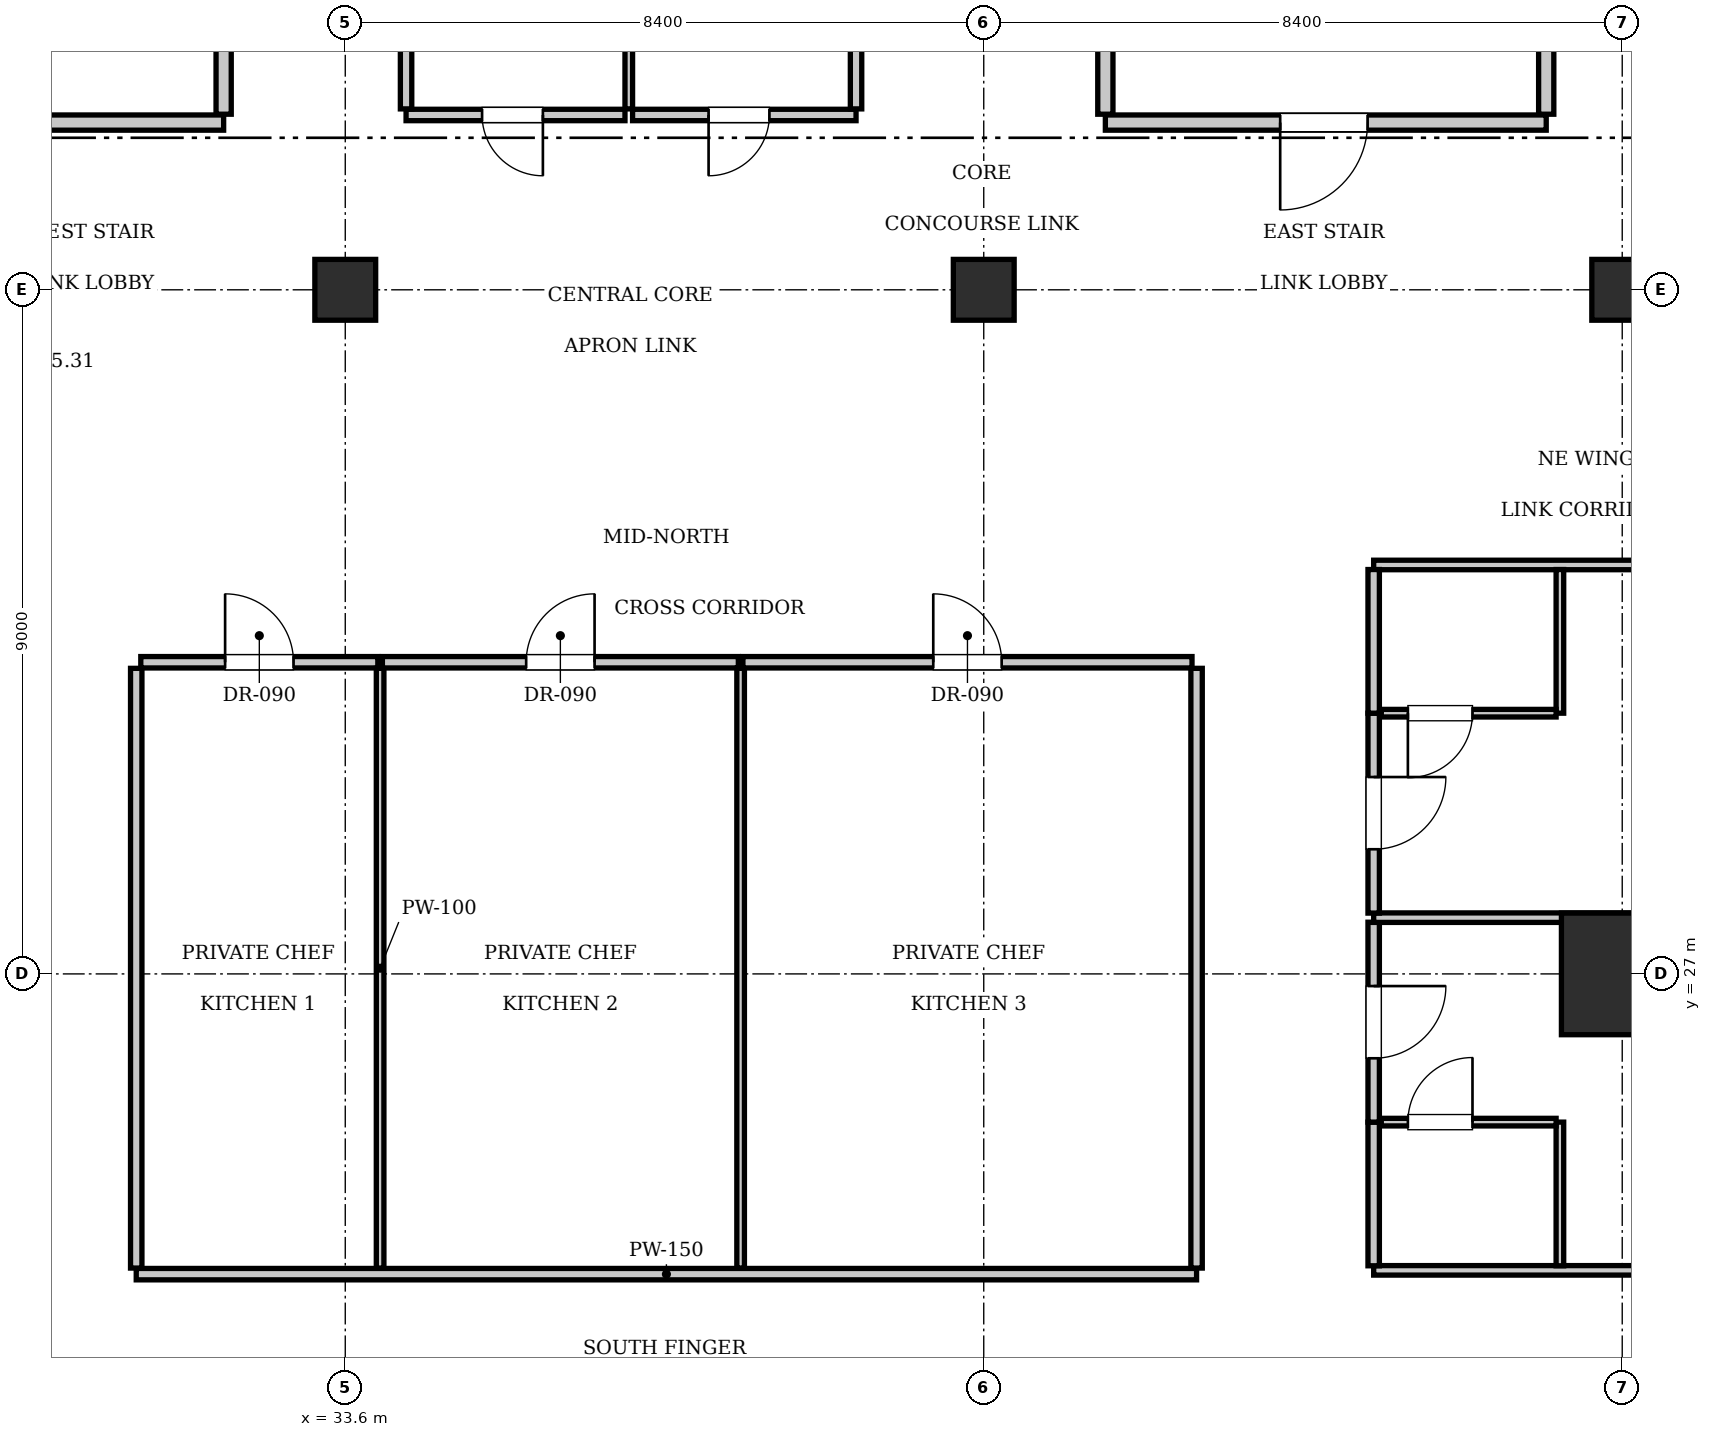
"""IFC4 building model, lengths in metres.
Left out: names, types, materials, properties, quantities, classifications, styles, units other than length and angle.
Written with IfcOpenShell. Run it as: python <this file> out.ifc"""

import sys

from ifc_helpers import new_model, si_unit, direction, frame, frame_2d, origin, origin_2d, place, context, subcontext, project, spatial, rectangle, extrude, element, fill, save


model = new_model("IFC4")
c1 = context("Model", 3, precision=1e-05, world=origin(), true_north=direction((0.0, 1.0)))
c2 = subcontext(c1, "Body", "Model", "MODEL_VIEW")
j1 = project(units=[si_unit("LENGTHUNIT", "METRE"), si_unit("PLANEANGLEUNIT", "RADIAN")], contexts=[c1])
p1 = place(None, origin())
s1 = spatial("IfcSite", under=j1, at=p1, CompositionType="ELEMENT")
p2 = place(p1, origin())
s2 = spatial("IfcBuilding", under=s1, at=p2, CompositionType="ELEMENT")
p3 = place(p2, frame((0.0, 0.0, 277.9)))
s3 = spatial("IfcBuildingStorey", under=s2, at=p3, CompositionType="ELEMENT", Elevation=277.9)
p4 = place(p3, frame((50.4, 27.0, 0.0), z_axis=(0.0, 0.0, 1.0), x_axis=(1.0, 0.0, 0.0)))
e1 = element("IfcColumn", 1, at=p4, inside=s3, PredefinedType="COLUMN", context=c2, shape_type="SweptSolid", body=[
    extrude(rectangle(XDim=1.6, YDim=1.6, at=origin_2d()), origin(), (0.0, 0.0, 1.0), 3.85),
])
for number, where, z_axis, x_axis in (
    (2, (33.6, 36.0, 0.0), (0.0, 0.0, 1.0), (1.0, 0.0, 0.0)),
    (3, (42.0, 36.0, 0.0), (0.0, 0.0, 1.0), (1.0, 0.0, 0.0)),
    (4, (50.4, 36.0, 0.0), (0.0, 0.0, 1.0), (1.0, 0.0, 0.0)),
):
    element("IfcColumn", number, at=place(p3, frame(where, z_axis=z_axis, x_axis=x_axis)), inside=s3, PredefinedType="COLUMN", context=c2, shape_type="SweptSolid", body=[
        extrude(rectangle(XDim=0.8, YDim=0.8, at=origin_2d()), origin(), (0.0, 0.0, 1.0), 3.85),
    ])
p5 = place(p3, frame((26.2, 38.2, 0.0), z_axis=(0.0, 0.0, 1.0), x_axis=(1.0, 0.0, 0.0)))
e5 = element("IfcWall", 5, at=p5, inside=s3, PredefinedType="PARTITIONING", context=c2, shape_type="SweptSolid", body=[
    extrude(rectangle(XDim=5.8, YDim=0.2, at=frame_2d((2.9, 0.0))), origin(), (0.0, 0.0, 1.0), 3.61),
])
p6 = place(p5, frame((2.3, 0.0, 0.0)))
e6 = element("IfcOpeningElement", 6, at=p6, cuts=e5, PredefinedType="OPENING", context=c2, shape_type="SweptSolid", body=[
    extrude(rectangle(XDim=1.15, YDim=2.15, at=frame_2d((0.575, 1.075))), frame((0.0, 0.11, 0.0), z_axis=(0.0, -1.0, 0.0), x_axis=(1.0, 0.0, 0.0)), (0.0, 0.0, 1.0), 0.22),
])
p7 = place(p3, frame((32.0, 38.31, 0.0), z_axis=(0.0, 0.0, 1.0), x_axis=(0.0, 1.0, 0.0)))
e7 = element("IfcWall", 7, at=p7, inside=s3, PredefinedType="PARTITIONING", context=c2, shape_type="SweptSolid", body=[
    extrude(rectangle(XDim=3.07, YDim=0.2, at=frame_2d((1.535, 0.0))), origin(), (0.0, 0.0, 1.0), 3.61),
])
p8 = place(p3, frame((43.6, 38.2, 0.0), z_axis=(0.0, 0.0, 1.0), x_axis=(1.0, 0.0, 0.0)))
e8 = element("IfcWall", 8, at=p8, inside=s3, PredefinedType="PARTITIONING", context=c2, shape_type="SweptSolid", body=[
    extrude(rectangle(XDim=5.8, YDim=0.2, at=frame_2d((2.9, 0.0))), origin(), (0.0, 0.0, 1.0), 3.61),
])
p9 = place(p8, frame((2.3, 0.0, 0.0)))
e9 = element("IfcOpeningElement", 9, at=p9, cuts=e8, PredefinedType="OPENING", context=c2, shape_type="SweptSolid", body=[
    extrude(rectangle(XDim=1.15, YDim=2.15, at=frame_2d((0.575, 1.075))), frame((0.0, 0.11, 0.0), z_axis=(0.0, -1.0, 0.0), x_axis=(1.0, 0.0, 0.0)), (0.0, 0.0, 1.0), 0.22),
])
for number, where, z_axis, x_axis in (
    (10, (43.6, 38.31, 0.0), (0.0, 0.0, 1.0), (0.0, 1.0, 0.0)),
    (11, (49.4, 38.31, 0.0), (0.0, 0.0, 1.0), (0.0, 1.0, 0.0)),
):
    element("IfcWall", number, at=place(p3, frame(where, z_axis=z_axis, x_axis=x_axis)), inside=s3, PredefinedType="PARTITIONING", context=c2, shape_type="SweptSolid", body=[
        extrude(rectangle(XDim=3.07, YDim=0.2, at=frame_2d((1.535, 0.0))), origin(), (0.0, 0.0, 1.0), 3.61),
    ])
p10 = place(p3, frame((34.4, 38.3, 0.0), z_axis=(0.0, 0.0, 1.0), x_axis=(1.0, 0.0, 0.0)))
e12 = element("IfcWall", 12, at=p10, inside=s3, PredefinedType="PARTITIONING", context=c2, shape_type="SweptSolid", body=[
    extrude(rectangle(XDim=2.88, YDim=0.15, at=frame_2d((1.44, 0.0))), origin(), (0.0, 0.0, 1.0), 3.61),
])
p11 = place(p10, frame((1.0, 0.0, 0.0)))
e13 = element("IfcOpeningElement", 13, at=p11, cuts=e12, PredefinedType="OPENING", context=c2, shape_type="SweptSolid", body=[
    extrude(rectangle(XDim=0.8, YDim=2.05, at=frame_2d((0.4, 1.025))), frame((0.0, 0.085, 0.0), z_axis=(0.0, -1.0, 0.0), x_axis=(1.0, 0.0, 0.0)), (0.0, 0.0, 1.0), 0.17),
])
p12 = place(p3, frame((37.38, 38.3, 0.0), z_axis=(0.0, 0.0, 1.0), x_axis=(1.0, 0.0, 0.0)))
e14 = element("IfcWall", 14, at=p12, inside=s3, PredefinedType="PARTITIONING", context=c2, shape_type="SweptSolid", body=[
    extrude(rectangle(XDim=2.94, YDim=0.15, at=frame_2d((1.47, 0.0))), origin(), (0.0, 0.0, 1.0), 3.61),
])
p13 = place(p12, frame((1.0, 0.0, 0.0)))
e15 = element("IfcOpeningElement", 15, at=p13, cuts=e14, PredefinedType="OPENING", context=c2, shape_type="SweptSolid", body=[
    extrude(rectangle(XDim=0.8, YDim=2.05, at=frame_2d((0.4, 1.025))), frame((0.0, 0.085, 0.0), z_axis=(0.0, -1.0, 0.0), x_axis=(1.0, 0.0, 0.0)), (0.0, 0.0, 1.0), 0.17),
])
p14 = place(p3, frame((34.4, 38.38, 0.0), z_axis=(0.0, 0.0, 1.0), x_axis=(0.0, 1.0, 0.0)))
e16 = element("IfcWall", 16, at=p14, inside=s3, PredefinedType="PARTITIONING", context=c2, shape_type="SweptSolid", body=[
    extrude(rectangle(XDim=2.84, YDim=0.15, at=frame_2d((1.42, 0.0))), origin(), (0.0, 0.0, 1.0), 3.61),
])
p15 = place(p3, frame((37.33, 38.38, 0.0), z_axis=(0.0, 0.0, 1.0), x_axis=(0.0, 1.0, 0.0)))
e17 = element("IfcWall", 17, at=p15, inside=s3, PredefinedType="PARTITIONING", context=c2, shape_type="SweptSolid", body=[
    extrude(rectangle(XDim=2.84, YDim=0.1, at=frame_2d((1.42, 0.0))), origin(), (0.0, 0.0, 1.0), 3.61),
])
p16 = place(p3, frame((40.32, 38.38, 0.0), z_axis=(0.0, 0.0, 1.0), x_axis=(0.0, 1.0, 0.0)))
e18 = element("IfcWall", 18, at=p16, inside=s3, PredefinedType="PARTITIONING", context=c2, shape_type="SweptSolid", body=[
    extrude(rectangle(XDim=2.84, YDim=0.15, at=frame_2d((1.42, 0.0))), origin(), (0.0, 0.0, 1.0), 3.61),
])
p17 = place(p3, frame((30.85, 23.05, 0.0), z_axis=(0.0, 0.0, 1.0), x_axis=(1.0, 0.0, 0.0)))
e19 = element("IfcWall", 19, at=p17, inside=s3, PredefinedType="PARTITIONING", context=c2, shape_type="SweptSolid", body=[
    extrude(rectangle(XDim=13.95, YDim=0.15, at=frame_2d((6.975, 0.0))), origin(), (0.0, 0.0, 1.0), 3.61),
])
for number, where, z_axis, x_axis in (
    (20, (30.85, 23.13, 0.0), (0.0, 0.0, 1.0), (0.0, 1.0, 0.0)),
    (21, (44.8, 23.13, 0.0), (0.0, 0.0, 1.0), (0.0, 1.0, 0.0)),
):
    element("IfcWall", number, at=place(p3, frame(where, z_axis=z_axis, x_axis=x_axis)), inside=s3, PredefinedType="PARTITIONING", context=c2, shape_type="SweptSolid", body=[
        extrude(rectangle(XDim=7.89, YDim=0.15, at=frame_2d((3.945, 0.0))), origin(), (0.0, 0.0, 1.0), 3.61),
    ])
p18 = place(p3, frame((30.91, 31.1, 0.0), z_axis=(0.0, 0.0, 1.0), x_axis=(1.0, 0.0, 0.0)))
e22 = element("IfcWall", 22, at=p18, inside=s3, PredefinedType="PARTITIONING", context=c2, shape_type="SweptSolid", body=[
    extrude(rectangle(XDim=3.119, YDim=0.15, at=frame_2d((1.559, 0.0))), origin(), (0.0, 0.0, 1.0), 3.61),
])
p19 = place(p18, frame((1.109, 0.0, 0.0)))
e23 = element("IfcOpeningElement", 23, at=p19, cuts=e22, PredefinedType="OPENING", context=c2, shape_type="SweptSolid", body=[
    extrude(rectangle(XDim=0.9, YDim=2.1, at=frame_2d((0.45, 1.05))), frame((0.0, 0.085, 0.0), z_axis=(0.0, -1.0, 0.0), x_axis=(1.0, 0.0, 0.0)), (0.0, 0.0, 1.0), 0.17),
])
p20 = place(p3, frame((34.059, 23.13, 0.0), z_axis=(0.0, 0.0, 1.0), x_axis=(0.0, 1.0, 0.0)))
e24 = element("IfcWall", 24, at=p20, inside=s3, PredefinedType="PARTITIONING", context=c2, shape_type="SweptSolid", body=[
    extrude(rectangle(XDim=7.89, YDim=0.1, at=frame_2d((3.945, 0.0))), origin(), (0.0, 0.0, 1.0), 3.61),
])
p21 = place(p3, frame((34.088, 31.1, 0.0), z_axis=(0.0, 0.0, 1.0), x_axis=(1.0, 0.0, 0.0)))
e25 = element("IfcWall", 25, at=p21, inside=s3, PredefinedType="PARTITIONING", context=c2, shape_type="SweptSolid", body=[
    extrude(rectangle(XDim=4.683, YDim=0.15, at=frame_2d((2.342, 0.0))), origin(), (0.0, 0.0, 1.0), 3.61),
])
p22 = place(p21, frame((1.892, 0.0, 0.0)))
e26 = element("IfcOpeningElement", 26, at=p22, cuts=e25, PredefinedType="OPENING", context=c2, shape_type="SweptSolid", body=[
    extrude(rectangle(XDim=0.9, YDim=2.1, at=frame_2d((0.45, 1.05))), frame((0.0, 0.085, 0.0), z_axis=(0.0, -1.0, 0.0), x_axis=(1.0, 0.0, 0.0)), (0.0, 0.0, 1.0), 0.17),
])
p23 = place(p3, frame((38.802, 23.13, 0.0), z_axis=(0.0, 0.0, 1.0), x_axis=(0.0, 1.0, 0.0)))
e27 = element("IfcWall", 27, at=p23, inside=s3, PredefinedType="PARTITIONING", context=c2, shape_type="SweptSolid", body=[
    extrude(rectangle(XDim=7.89, YDim=0.1, at=frame_2d((3.945, 0.0))), origin(), (0.0, 0.0, 1.0), 3.61),
])
p24 = place(p3, frame((38.832, 31.1, 0.0), z_axis=(0.0, 0.0, 1.0), x_axis=(1.0, 0.0, 0.0)))
e28 = element("IfcWall", 28, at=p24, inside=s3, PredefinedType="PARTITIONING", context=c2, shape_type="SweptSolid", body=[
    extrude(rectangle(XDim=5.908, YDim=0.15, at=frame_2d((2.954, 0.0))), origin(), (0.0, 0.0, 1.0), 3.61),
])
p25 = place(p24, frame((2.504, 0.0, 0.0)))
e29 = element("IfcOpeningElement", 29, at=p25, cuts=e28, PredefinedType="OPENING", context=c2, shape_type="SweptSolid", body=[
    extrude(rectangle(XDim=0.9, YDim=2.1, at=frame_2d((0.45, 1.05))), frame((0.0, 0.085, 0.0), z_axis=(0.0, -1.0, 0.0), x_axis=(1.0, 0.0, 0.0)), (0.0, 0.0, 1.0), 0.17),
])
for number, where, z_axis, x_axis in (
    (30, (47.13, 23.1, 0.0), (0.0, 0.0, 1.0), (1.0, 0.0, 0.0)),
    (31, (47.13, 32.38, 0.0), (0.0, 0.0, 1.0), (1.0, 0.0, 0.0)),
):
    element("IfcWall", number, at=place(p3, frame(where, z_axis=z_axis, x_axis=x_axis)), inside=s3, PredefinedType="PARTITIONING", context=c2, shape_type="SweptSolid", body=[
        extrude(rectangle(XDim=12.97, YDim=0.125, at=frame_2d((6.485, 0.0))), origin(), (0.0, 0.0, 1.0), 3.61),
    ])
p26 = place(p3, frame((47.13, 23.16, 0.0), z_axis=(0.0, 0.0, 1.0), x_axis=(0.0, 1.0, 0.0)))
e32 = element("IfcWall", 32, at=p26, inside=s3, PredefinedType="PARTITIONING", context=c2, shape_type="SweptSolid", body=[
    extrude(rectangle(XDim=1.89, YDim=0.15, at=frame_2d((0.945, 0.0))), origin(), (0.0, 0.0, 1.0), 3.61),
])
p27 = place(p3, frame((47.13, 25.05, 0.0), z_axis=(0.0, 0.0, 1.0), x_axis=(0.0, 1.0, 0.0)))
e33 = element("IfcWall", 33, at=p27, inside=s3, PredefinedType="PARTITIONING", context=c2, shape_type="SweptSolid", body=[
    extrude(rectangle(XDim=2.63, YDim=0.15, at=frame_2d((1.315, 0.0))), origin(), (0.0, 0.0, 1.0), 3.61),
])
p28 = place(p27, frame((0.84, 0.0, 0.0)))
e34 = element("IfcOpeningElement", 34, at=p28, cuts=e33, PredefinedType="OPENING", context=c2, shape_type="SweptSolid", body=[
    extrude(rectangle(XDim=0.95, YDim=2.15, at=frame_2d((0.475, 1.075))), frame((0.0, 0.085, 0.0), z_axis=(0.0, -1.0, 0.0), x_axis=(1.0, 0.0, 0.0)), (0.0, 0.0, 1.0), 0.17),
])
p29 = place(p3, frame((49.58, 23.16, 0.0), z_axis=(0.0, 0.0, 1.0), x_axis=(0.0, 1.0, 0.0)))
e35 = element("IfcWall", 35, at=p29, inside=s3, PredefinedType="PARTITIONING", context=c2, shape_type="SweptSolid", body=[
    extrude(rectangle(XDim=1.89, YDim=0.1, at=frame_2d((0.945, 0.0))), origin(), (0.0, 0.0, 1.0), 3.61),
])
p30 = place(p3, frame((47.23, 25.05, 0.0), z_axis=(0.0, 0.0, 1.0), x_axis=(1.0, 0.0, 0.0)))
e36 = element("IfcWall", 36, at=p30, inside=s3, PredefinedType="PARTITIONING", context=c2, shape_type="SweptSolid", body=[
    extrude(rectangle(XDim=2.3, YDim=0.1, at=frame_2d((1.15, 0.0))), origin(), (0.0, 0.0, 1.0), 3.61),
])
p31 = place(p30, frame((0.35, 0.0, 0.0)))
e37 = element("IfcOpeningElement", 37, at=p31, cuts=e36, PredefinedType="OPENING", context=c2, shape_type="SweptSolid", body=[
    extrude(rectangle(XDim=0.85, YDim=2.1, at=frame_2d((0.425, 1.05))), frame((0.0, 0.06, 0.0), z_axis=(0.0, -1.0, 0.0), x_axis=(1.0, 0.0, 0.0)), (0.0, 0.0, 1.0), 0.12),
])
p32 = place(p3, frame((47.13, 27.74, 0.0), z_axis=(0.0, 0.0, 1.0), x_axis=(1.0, 0.0, 0.0)))
e38 = element("IfcWall", 38, at=p32, inside=s3, PredefinedType="PARTITIONING", context=c2, shape_type="SweptSolid", body=[
    extrude(rectangle(XDim=12.97, YDim=0.125, at=frame_2d((6.485, 0.0))), origin(), (0.0, 0.0, 1.0), 3.61),
])
p33 = place(p3, frame((47.13, 27.8, 0.0), z_axis=(0.0, 0.0, 1.0), x_axis=(0.0, 1.0, 0.0)))
e39 = element("IfcWall", 39, at=p33, inside=s3, PredefinedType="PARTITIONING", context=c2, shape_type="SweptSolid", body=[
    extrude(rectangle(XDim=2.63, YDim=0.15, at=frame_2d((1.315, 0.0))), origin(), (0.0, 0.0, 1.0), 3.61),
])
p34 = place(p33, frame((0.84, 0.0, 0.0)))
e40 = element("IfcOpeningElement", 40, at=p34, cuts=e39, PredefinedType="OPENING", context=c2, shape_type="SweptSolid", body=[
    extrude(rectangle(XDim=0.95, YDim=2.15, at=frame_2d((0.475, 1.075))), frame((0.0, 0.085, 0.0), z_axis=(0.0, -1.0, 0.0), x_axis=(1.0, 0.0, 0.0)), (0.0, 0.0, 1.0), 0.17),
])
p35 = place(p3, frame((47.13, 30.43, 0.0), z_axis=(0.0, 0.0, 1.0), x_axis=(0.0, 1.0, 0.0)))
e41 = element("IfcWall", 41, at=p35, inside=s3, PredefinedType="PARTITIONING", context=c2, shape_type="SweptSolid", body=[
    extrude(rectangle(XDim=1.89, YDim=0.15, at=frame_2d((0.945, 0.0))), origin(), (0.0, 0.0, 1.0), 3.61),
])
p36 = place(p3, frame((49.58, 30.43, 0.0), z_axis=(0.0, 0.0, 1.0), x_axis=(0.0, 1.0, 0.0)))
e42 = element("IfcWall", 42, at=p36, inside=s3, PredefinedType="PARTITIONING", context=c2, shape_type="SweptSolid", body=[
    extrude(rectangle(XDim=1.89, YDim=0.1, at=frame_2d((0.945, 0.0))), origin(), (0.0, 0.0, 1.0), 3.61),
])
p37 = place(p3, frame((47.23, 30.43, 0.0), z_axis=(0.0, 0.0, 1.0), x_axis=(1.0, 0.0, 0.0)))
e43 = element("IfcWall", 43, at=p37, inside=s3, PredefinedType="PARTITIONING", context=c2, shape_type="SweptSolid", body=[
    extrude(rectangle(XDim=2.3, YDim=0.1, at=frame_2d((1.15, 0.0))), origin(), (0.0, 0.0, 1.0), 3.61),
])
p38 = place(p37, frame((0.35, 0.0, 0.0)))
e44 = element("IfcOpeningElement", 44, at=p38, cuts=e43, PredefinedType="OPENING", context=c2, shape_type="SweptSolid", body=[
    extrude(rectangle(XDim=0.85, YDim=2.1, at=frame_2d((0.425, 1.05))), frame((0.0, 0.06, 0.0), z_axis=(0.0, -1.0, 0.0), x_axis=(1.0, 0.0, 0.0)), (0.0, 0.0, 1.0), 0.12),
])
p39 = place(p9, frame((1.15, 0.0, 0.0), z_axis=(0.0, 0.0, 1.0), x_axis=(-1.0, 0.0, 0.0)))
e45 = element("IfcDoor", 45, at=p39, inside=s3, OperationType="SINGLE_SWING_RIGHT", PredefinedType="DOOR", context=c2, shape_type="SweptSolid", body=[
    extrude(rectangle(XDim=1.15, YDim=2.15, at=frame_2d((0.575, 1.075))), frame((0.0, 0.025, 0.0), z_axis=(0.0, -1.0, 0.0), x_axis=(1.0, 0.0, 0.0)), (0.0, 0.0, 1.0), 0.05),
])
fill(e9, e45)
p40 = place(p11, frame((0.8, 0.0, 0.0), z_axis=(0.0, 0.0, 1.0), x_axis=(-1.0, 0.0, 0.0)))
e46 = element("IfcDoor", 46, at=p40, inside=s3, OperationType="SINGLE_SWING_LEFT", PredefinedType="DOOR", context=c2, shape_type="SweptSolid", body=[
    extrude(rectangle(XDim=0.8, YDim=2.05, at=frame_2d((0.4, 1.025))), frame((0.0, 0.025, 0.0), z_axis=(0.0, -1.0, 0.0), x_axis=(1.0, 0.0, 0.0)), (0.0, 0.0, 1.0), 0.05),
])
fill(e13, e46)
p41 = place(p13, frame((0.8, 0.0, 0.0), z_axis=(0.0, 0.0, 1.0), x_axis=(-1.0, 0.0, 0.0)))
e47 = element("IfcDoor", 47, at=p41, inside=s3, OperationType="SINGLE_SWING_RIGHT", PredefinedType="DOOR", context=c2, shape_type="SweptSolid", body=[
    extrude(rectangle(XDim=0.8, YDim=2.05, at=frame_2d((0.4, 1.025))), frame((0.0, 0.025, 0.0), z_axis=(0.0, -1.0, 0.0), x_axis=(1.0, 0.0, 0.0)), (0.0, 0.0, 1.0), 0.05),
])
fill(e15, e47)
p42 = place(p19, origin())
e48 = element("IfcDoor", 48, at=p42, inside=s3, OperationType="SINGLE_SWING_LEFT", PredefinedType="DOOR", context=c2, shape_type="SweptSolid", body=[
    extrude(rectangle(XDim=0.9, YDim=2.1, at=frame_2d((0.45, 1.05))), frame((0.0, 0.025, 0.0), z_axis=(0.0, -1.0, 0.0), x_axis=(1.0, 0.0, 0.0)), (0.0, 0.0, 1.0), 0.05),
])
fill(e23, e48)
p43 = place(p22, origin())
e49 = element("IfcDoor", 49, at=p43, inside=s3, OperationType="SINGLE_SWING_RIGHT", PredefinedType="DOOR", context=c2, shape_type="SweptSolid", body=[
    extrude(rectangle(XDim=0.9, YDim=2.1, at=frame_2d((0.45, 1.05))), frame((0.0, 0.025, 0.0), z_axis=(0.0, -1.0, 0.0), x_axis=(1.0, 0.0, 0.0)), (0.0, 0.0, 1.0), 0.05),
])
fill(e26, e49)
p44 = place(p25, origin())
e50 = element("IfcDoor", 50, at=p44, inside=s3, OperationType="SINGLE_SWING_LEFT", PredefinedType="DOOR", context=c2, shape_type="SweptSolid", body=[
    extrude(rectangle(XDim=0.9, YDim=2.1, at=frame_2d((0.45, 1.05))), frame((0.0, 0.025, 0.0), z_axis=(0.0, -1.0, 0.0), x_axis=(1.0, 0.0, 0.0)), (0.0, 0.0, 1.0), 0.05),
])
fill(e29, e50)
p45 = place(p31, origin())
e51 = element("IfcDoor", 51, at=p45, inside=s3, OperationType="SINGLE_SWING_RIGHT", PredefinedType="DOOR", context=c2, shape_type="SweptSolid", body=[
    extrude(rectangle(XDim=0.85, YDim=2.1, at=frame_2d((0.425, 1.05))), frame((0.0, 0.025, 0.0), z_axis=(0.0, -1.0, 0.0), x_axis=(1.0, 0.0, 0.0)), (0.0, 0.0, 1.0), 0.05),
])
fill(e37, e51)
p46 = place(p28, frame((0.95, 0.0, 0.0), z_axis=(0.0, 0.0, 1.0), x_axis=(-1.0, 0.0, 0.0)))
e52 = element("IfcDoor", 52, at=p46, inside=s3, OperationType="SINGLE_SWING_LEFT", PredefinedType="DOOR", context=c2, shape_type="SweptSolid", body=[
    extrude(rectangle(XDim=0.95, YDim=2.15, at=frame_2d((0.475, 1.075))), frame((0.0, 0.025, 0.0), z_axis=(0.0, -1.0, 0.0), x_axis=(1.0, 0.0, 0.0)), (0.0, 0.0, 1.0), 0.05),
])
fill(e34, e52)
p47 = place(p38, frame((0.85, 0.0, 0.0), z_axis=(0.0, 0.0, 1.0), x_axis=(-1.0, 0.0, 0.0)))
e53 = element("IfcDoor", 53, at=p47, inside=s3, OperationType="SINGLE_SWING_RIGHT", PredefinedType="DOOR", context=c2, shape_type="SweptSolid", body=[
    extrude(rectangle(XDim=0.85, YDim=2.1, at=frame_2d((0.425, 1.05))), frame((0.0, 0.025, 0.0), z_axis=(0.0, -1.0, 0.0), x_axis=(1.0, 0.0, 0.0)), (0.0, 0.0, 1.0), 0.05),
])
fill(e44, e53)
p48 = place(p34, frame((0.95, 0.0, 0.0), z_axis=(0.0, 0.0, 1.0), x_axis=(-1.0, 0.0, 0.0)))
e54 = element("IfcDoor", 54, at=p48, inside=s3, OperationType="SINGLE_SWING_LEFT", PredefinedType="DOOR", context=c2, shape_type="SweptSolid", body=[
    extrude(rectangle(XDim=0.95, YDim=2.15, at=frame_2d((0.475, 1.075))), frame((0.0, 0.025, 0.0), z_axis=(0.0, -1.0, 0.0), x_axis=(1.0, 0.0, 0.0)), (0.0, 0.0, 1.0), 0.05),
])
fill(e40, e54)
save(model, sys.argv[1])
